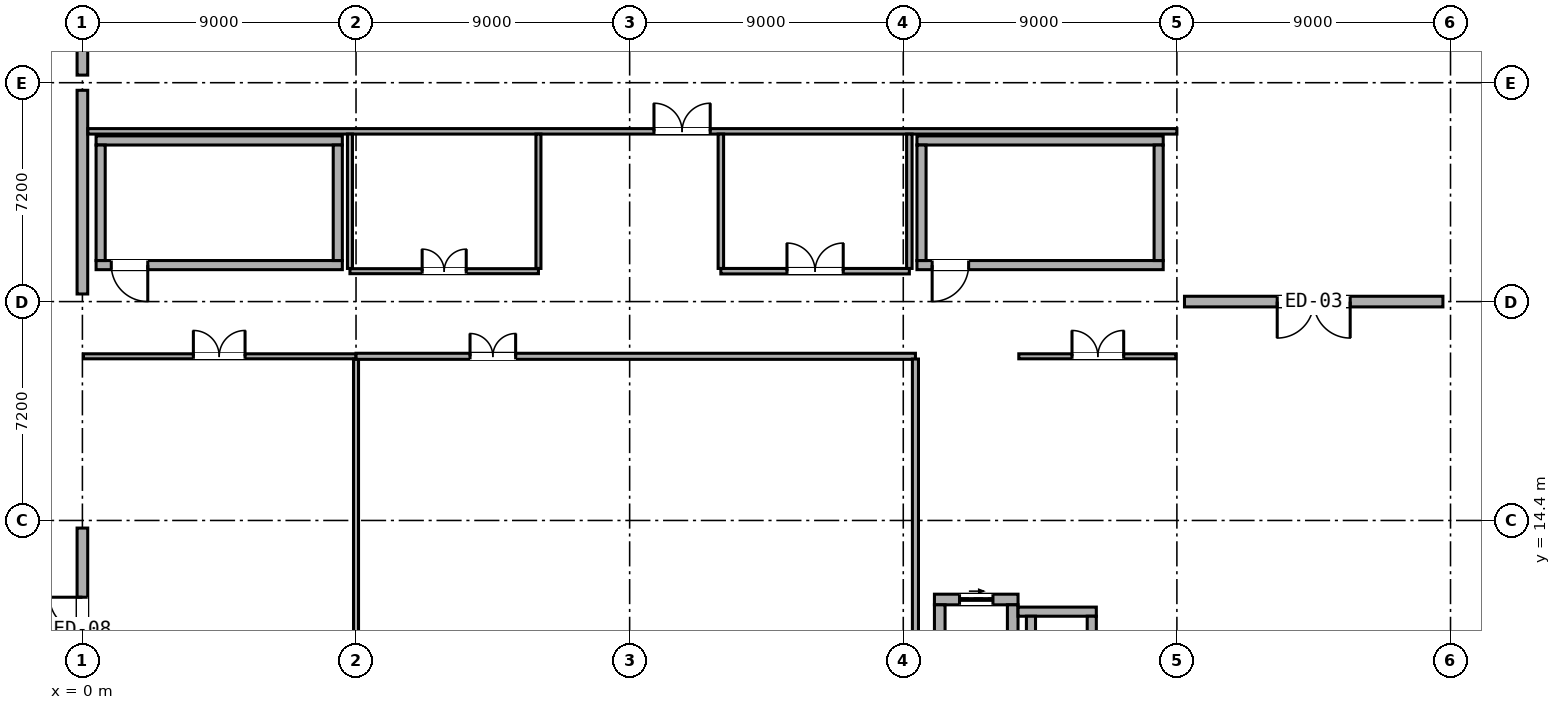
"""IFC4 building model, lengths in metres.
Left out: names, types, materials, properties, quantities, classifications, styles, units other than length and angle.
Written with IfcOpenShell. Run it as: python <this file> out.ifc"""

import sys

from ifc_helpers import new_model, si_unit, direction, frame, frame_2d, origin, origin_2d, place, context, subcontext, project, spatial, rectangle, hollow_rectangle, extrude, element, fill, save


model = new_model("IFC4")
c1 = context("Model", 3, precision=1e-05, world=origin(), true_north=direction((0.0, 1.0)))
c2 = subcontext(c1, "Body", "Model", "MODEL_VIEW")
j1 = project(units=[si_unit("LENGTHUNIT", "METRE"), si_unit("PLANEANGLEUNIT", "RADIAN")], contexts=[c1])
p1 = place(None, origin())
s1 = spatial("IfcSite", under=j1, at=p1, CompositionType="ELEMENT")
p2 = place(p1, origin())
s2 = spatial("IfcBuilding", under=s1, at=p2, CompositionType="ELEMENT")
p3 = place(p2, origin())
s3 = spatial("IfcBuildingStorey", under=s2, at=p3, CompositionType="ELEMENT", Elevation=0.0)
for number, where, z_axis, x_axis in (
    (1, (0.0, 14.4, 0.0), (0.0, 0.0, 1.0), (1.0, 0.0, 0.0)),
    (2, (0.0, 21.6, 0.0), (0.0, 0.0, 1.0), (1.0, 0.0, 0.0)),
    (3, (0.0, 28.8, 0.0), (0.0, 0.0, 1.0), (1.0, 0.0, 0.0)),
):
    element("IfcColumn", number, at=place(p3, frame(where, z_axis=z_axis, x_axis=x_axis)), inside=s3, PredefinedType="COLUMN", context=c2, shape_type="SweptSolid", body=[
        extrude(hollow_rectangle(XDim=0.5, YDim=0.5, WallThickness=0.022, at=origin_2d()), origin(), (0.0, 0.0, 1.0), 4.8),
    ])
for number, where, z_axis, x_axis in (
    (4, (9.0, 14.4, 0.0), (0.0, 0.0, 1.0), (1.0, 0.0, 0.0)),
    (5, (9.0, 21.6, 0.0), (0.0, 0.0, 1.0), (1.0, 0.0, 0.0)),
    (6, (9.0, 28.8, 0.0), (0.0, 0.0, 1.0), (1.0, 0.0, 0.0)),
    (7, (18.0, 21.6, 0.0), (0.0, 0.0, 1.0), (1.0, 0.0, 0.0)),
    (8, (18.0, 28.8, 0.0), (0.0, 0.0, 1.0), (1.0, 0.0, 0.0)),
    (9, (27.0, 14.4, 0.0), (0.0, 0.0, 1.0), (1.0, 0.0, 0.0)),
    (10, (27.0, 21.6, 0.0), (0.0, 0.0, 1.0), (1.0, 0.0, 0.0)),
    (11, (27.0, 28.8, 0.0), (0.0, 0.0, 1.0), (1.0, 0.0, 0.0)),
):
    element("IfcColumn", number, at=place(p3, frame(where, z_axis=z_axis, x_axis=x_axis)), inside=s3, PredefinedType="COLUMN", context=c2, shape_type="SweptSolid", body=[
        extrude(hollow_rectangle(XDim=0.65, YDim=0.65, WallThickness=0.025, at=origin_2d()), origin(), (0.0, 0.0, 1.0), 4.8),
    ])
for number, where, z_axis, x_axis in (
    (12, (36.0, 14.4, 0.0), (0.0, 0.0, 1.0), (1.0, 0.0, 0.0)),
    (13, (36.0, 21.6, 0.0), (0.0, 0.0, 1.0), (1.0, 0.0, 0.0)),
    (14, (36.0, 28.8, 0.0), (0.0, 0.0, 1.0), (1.0, 0.0, 0.0)),
):
    element("IfcColumn", number, at=place(p3, frame(where, z_axis=z_axis, x_axis=x_axis)), inside=s3, PredefinedType="COLUMN", context=c2, shape_type="SweptSolid", body=[
        extrude(hollow_rectangle(XDim=0.5, YDim=0.5, WallThickness=0.022, at=origin_2d()), origin(), (0.0, 0.0, 1.0), 4.8),
    ])
p4 = place(p3, frame((45.0, 14.4, 0.0), z_axis=(0.0, 0.0, 1.0), x_axis=(1.0, 0.0, 0.0)))
e15 = element("IfcColumn", 15, at=p4, inside=s3, PredefinedType="COLUMN", context=c2, shape_type="SweptSolid", body=[
    extrude(hollow_rectangle(XDim=0.5, YDim=0.5, WallThickness=0.022, at=origin_2d()), origin(), (0.0, 0.0, 1.0), 4.58),
])
for number, where, z_axis, x_axis in (
    (16, (45.0, 21.6, 0.0), (0.0, 0.0, 1.0), (1.0, 0.0, 0.0)),
    (17, (45.0, 28.8, 0.0), (0.0, 0.0, 1.0), (1.0, 0.0, 0.0)),
):
    element("IfcColumn", number, at=place(p3, frame(where, z_axis=z_axis, x_axis=x_axis)), inside=s3, PredefinedType="COLUMN", context=c2, shape_type="SweptSolid", body=[
        extrude(hollow_rectangle(XDim=0.5, YDim=0.5, WallThickness=0.022, at=origin_2d()), origin(), (0.0, 0.0, 1.0), 4.8),
    ])
p5 = place(p3, frame((36.25, 21.6, 0.0), z_axis=(0.0, 0.0, 1.0), x_axis=(1.0, 0.0, 0.0)))
e18 = element("IfcWall", 18, at=p5, inside=s3, PredefinedType="STANDARD", context=c2, shape_type="SweptSolid", body=[
    extrude(rectangle(XDim=8.5, YDim=0.35, at=frame_2d((4.25, 0.0))), origin(), (0.0, 0.0, 1.0), 4.055),
])
p6 = place(p5, frame((3.05, 0.0, 0.0)))
e19 = element("IfcOpeningElement", 19, at=p6, cuts=e18, PredefinedType="OPENING", context=c2, shape_type="SweptSolid", body=[
    extrude(rectangle(XDim=2.4, YDim=2.55, at=frame_2d((1.2, 1.275))), frame((0.0, 0.187, 0.0), z_axis=(0.0, -1.0, 0.0), x_axis=(1.0, 0.0, 0.0)), (0.0, 0.0, 1.0), 0.374),
])
p7 = place(p3, frame((0.0, 7.45, 0.0), z_axis=(0.0, 0.0, 1.0), x_axis=(0.0, 1.0, 0.0)))
e20 = element("IfcWall", 20, at=p7, inside=s3, PredefinedType="STANDARD", context=c2, shape_type="SweptSolid", body=[
    extrude(rectangle(XDim=6.7, YDim=0.35, at=frame_2d((3.35, 0.0))), origin(), (0.0, 0.0, 1.0), 4.055),
])
p8 = place(p7, frame((2.275, 0.0, 0.0)))
e21 = element("IfcOpeningElement", 21, at=p8, cuts=e20, PredefinedType="OPENING", context=c2, shape_type="SweptSolid", body=[
    extrude(rectangle(XDim=2.15, YDim=2.48, at=frame_2d((1.075, 1.24))), frame((0.0, 0.187, 0.0), z_axis=(0.0, -1.0, 0.0), x_axis=(1.0, 0.0, 0.0)), (0.0, 0.0, 1.0), 0.374),
])
p9 = place(p3, frame((0.0, 21.85, 0.0), z_axis=(0.0, 0.0, 1.0), x_axis=(0.0, 1.0, 0.0)))
e22 = element("IfcWall", 22, at=p9, inside=s3, PredefinedType="STANDARD", context=c2, shape_type="SweptSolid", body=[
    extrude(rectangle(XDim=6.7, YDim=0.35, at=frame_2d((3.35, 0.0))), origin(), (0.0, 0.0, 1.0), 4.055),
])
p10 = place(p3, frame((0.0, 29.05, 0.0), z_axis=(0.0, 0.0, 1.0), x_axis=(0.0, 1.0, 0.0)))
e23 = element("IfcWall", 23, at=p10, inside=s3, PredefinedType="STANDARD", context=c2, shape_type="SweptSolid", body=[
    extrude(rectangle(XDim=6.7, YDim=0.35, at=frame_2d((3.35, 0.0))), origin(), (0.0, 0.0, 1.0), 4.055),
])
p11 = place(p10, frame((2.05, 0.0, 0.85)))
e24 = element("IfcOpeningElement", 24, at=p11, cuts=e23, PredefinedType="OPENING", context=c2, shape_type="SweptSolid", body=[
    extrude(rectangle(XDim=2.6, YDim=1.6, at=frame_2d((1.3, 0.8))), frame((0.0, 0.187, 0.0), z_axis=(0.0, -1.0, 0.0), x_axis=(1.0, 0.0, 0.0)), (0.0, 0.0, 1.0), 0.374),
])
p12 = place(p3, frame((0.45, 22.8, 0.0), z_axis=(0.0, 0.0, 1.0), x_axis=(1.0, 0.0, 0.0)))
e25 = element("IfcWall", 25, at=p12, inside=s3, PredefinedType="SHEAR", context=c2, shape_type="SweptSolid", body=[
    extrude(rectangle(XDim=8.1, YDim=0.3, at=frame_2d((4.05, 0.0))), origin(), (0.0, 0.0, 1.0), 4.555),
])
p13 = place(p12, frame((0.5, 0.0, 0.0)))
e26 = element("IfcOpeningElement", 26, at=p13, cuts=e25, PredefinedType="OPENING", context=c2, shape_type="SweptSolid", body=[
    extrude(rectangle(XDim=1.2, YDim=2.1, at=frame_2d((0.6, 1.05))), frame((0.0, 0.162, 0.0), z_axis=(0.0, -1.0, 0.0), x_axis=(1.0, 0.0, 0.0)), (0.0, 0.0, 1.0), 0.324),
])
p14 = place(p3, frame((0.45, 26.9, 0.0), z_axis=(0.0, 0.0, 1.0), x_axis=(1.0, 0.0, 0.0)))
e27 = element("IfcWall", 27, at=p14, inside=s3, PredefinedType="SHEAR", context=c2, shape_type="SweptSolid", body=[
    extrude(rectangle(XDim=8.1, YDim=0.3, at=frame_2d((4.05, 0.0))), origin(), (0.0, 0.0, 1.0), 4.555),
])
for number, where, z_axis, x_axis in (
    (28, (0.6, 22.95, 0.0), (0.0, 0.0, 1.0), (0.0, 1.0, 0.0)),
    (29, (8.4, 22.95, 0.0), (0.0, 0.0, 1.0), (0.0, 1.0, 0.0)),
):
    element("IfcWall", number, at=place(p3, frame(where, z_axis=z_axis, x_axis=x_axis)), inside=s3, PredefinedType="SHEAR", context=c2, shape_type="SweptSolid", body=[
        extrude(rectangle(XDim=3.8, YDim=0.3, at=frame_2d((1.9, 0.0))), origin(), (0.0, 0.0, 1.0), 4.555),
    ])
p15 = place(p3, frame((27.45, 22.8, 0.0), z_axis=(0.0, 0.0, 1.0), x_axis=(1.0, 0.0, 0.0)))
e30 = element("IfcWall", 30, at=p15, inside=s3, PredefinedType="SHEAR", context=c2, shape_type="SweptSolid", body=[
    extrude(rectangle(XDim=8.1, YDim=0.3, at=frame_2d((4.05, 0.0))), origin(), (0.0, 0.0, 1.0), 4.555),
])
p16 = place(p15, frame((0.5, 0.0, 0.0)))
e31 = element("IfcOpeningElement", 31, at=p16, cuts=e30, PredefinedType="OPENING", context=c2, shape_type="SweptSolid", body=[
    extrude(rectangle(XDim=1.2, YDim=2.1, at=frame_2d((0.6, 1.05))), frame((0.0, 0.162, 0.0), z_axis=(0.0, -1.0, 0.0), x_axis=(1.0, 0.0, 0.0)), (0.0, 0.0, 1.0), 0.324),
])
p17 = place(p3, frame((27.45, 26.9, 0.0), z_axis=(0.0, 0.0, 1.0), x_axis=(1.0, 0.0, 0.0)))
e32 = element("IfcWall", 32, at=p17, inside=s3, PredefinedType="SHEAR", context=c2, shape_type="SweptSolid", body=[
    extrude(rectangle(XDim=8.1, YDim=0.3, at=frame_2d((4.05, 0.0))), origin(), (0.0, 0.0, 1.0), 4.555),
])
for number, where, z_axis, x_axis in (
    (33, (27.6, 22.95, 0.0), (0.0, 0.0, 1.0), (0.0, 1.0, 0.0)),
    (34, (35.4, 22.95, 0.0), (0.0, 0.0, 1.0), (0.0, 1.0, 0.0)),
):
    element("IfcWall", number, at=place(p3, frame(where, z_axis=z_axis, x_axis=x_axis)), inside=s3, PredefinedType="SHEAR", context=c2, shape_type="SweptSolid", body=[
        extrude(rectangle(XDim=3.8, YDim=0.3, at=frame_2d((1.9, 0.0))), origin(), (0.0, 0.0, 1.0), 4.555),
    ])
p18 = place(p3, frame((28.025, 11.8, 0.0), z_axis=(0.0, 0.0, 1.0), x_axis=(1.0, 0.0, 0.0)))
e35 = element("IfcWall", 35, at=p18, inside=s3, PredefinedType="SHEAR", context=c2, shape_type="SweptSolid", body=[
    extrude(rectangle(XDim=2.75, YDim=0.35, at=frame_2d((1.375, 0.0))), origin(), (0.0, 0.0, 1.0), 4.555),
])
p19 = place(p18, frame((0.825, 0.0, 0.0)))
e36 = element("IfcOpeningElement", 36, at=p19, cuts=e35, PredefinedType="OPENING", context=c2, shape_type="SweptSolid", body=[
    extrude(rectangle(XDim=1.1, YDim=2.1, at=frame_2d((0.55, 1.05))), frame((0.0, 0.187, 0.0), z_axis=(0.0, -1.0, 0.0), x_axis=(1.0, 0.0, 0.0)), (0.0, 0.0, 1.0), 0.374),
])
for number, where, z_axis, x_axis in (
    (37, (28.2, 9.375, 0.0), (0.0, 0.0, 1.0), (0.0, 1.0, 0.0)),
    (38, (30.6, 9.375, 0.0), (0.0, 0.0, 1.0), (0.0, 1.0, 0.0)),
):
    element("IfcWall", number, at=place(p3, frame(where, z_axis=z_axis, x_axis=x_axis)), inside=s3, PredefinedType="SHEAR", context=c2, shape_type="SweptSolid", body=[
        extrude(rectangle(XDim=2.25, YDim=0.35, at=frame_2d((1.125, 0.0))), origin(), (0.0, 0.0, 1.0), 4.555),
    ])
p20 = place(p3, frame((30.775, 11.4, 0.0), z_axis=(0.0, 0.0, 1.0), x_axis=(1.0, 0.0, 0.0)))
e39 = element("IfcWall", 39, at=p20, inside=s3, PredefinedType="SHEAR", context=c2, shape_type="SweptSolid", body=[
    extrude(rectangle(XDim=2.575, YDim=0.3, at=frame_2d((1.288, 0.0))), origin(), (0.0, 0.0, 1.0), 4.555),
])
for number, where, z_axis, x_axis in (
    (40, (31.2, 9.35, 0.0), (0.0, 0.0, 1.0), (0.0, 1.0, 0.0)),
    (41, (33.2, 9.35, 0.0), (0.0, 0.0, 1.0), (0.0, 1.0, 0.0)),
):
    element("IfcWall", number, at=place(p3, frame(where, z_axis=z_axis, x_axis=x_axis)), inside=s3, PredefinedType="SHEAR", context=c2, shape_type="SweptSolid", body=[
        extrude(rectangle(XDim=1.9, YDim=0.3, at=frame_2d((0.95, 0.0))), origin(), (0.0, 0.0, 1.0), 4.555),
    ])
p21 = place(p3, frame((0.035, 19.8, 0.0), z_axis=(0.0, 0.0, 1.0), x_axis=(1.0, 0.0, 0.0)))
e42 = element("IfcWall", 42, at=p21, inside=s3, PredefinedType="PARTITIONING", context=c2, shape_type="SweptSolid", body=[
    extrude(rectangle(XDim=8.965, YDim=0.165, at=frame_2d((4.482, 0.0))), origin(), (0.0, 0.0, 1.0), 4.555),
])
p22 = place(p21, frame((3.615, 0.0, 0.0)))
e43 = element("IfcOpeningElement", 43, at=p22, cuts=e42, PredefinedType="OPENING", context=c2, shape_type="SweptSolid", body=[
    extrude(rectangle(XDim=1.7, YDim=2.12, at=frame_2d((0.85, 1.06))), frame((0.0, 0.094, 0.0), z_axis=(0.0, -1.0, 0.0), x_axis=(1.0, 0.0, 0.0)), (0.0, 0.0, 1.0), 0.189),
])
p23 = place(p3, frame((9.0, 0.6, 0.0), z_axis=(0.0, 0.0, 1.0), x_axis=(0.0, 1.0, 0.0)))
e44 = element("IfcWall", 44, at=p23, inside=s3, PredefinedType="PARTITIONING", context=c2, shape_type="SweptSolid", body=[
    extrude(rectangle(XDim=19.11, YDim=0.165, at=frame_2d((9.555, 0.0))), origin(), (0.0, 0.0, 1.0), 3.835),
])
p24 = place(p3, frame((9.0, 19.8, 0.0), z_axis=(0.0, 0.0, 1.0), x_axis=(1.0, 0.0, 0.0)))
e45 = element("IfcWall", 45, at=p24, inside=s3, PredefinedType="PARTITIONING", context=c2, shape_type="SweptSolid", body=[
    extrude(rectangle(XDim=18.4, YDim=0.2, at=frame_2d((9.2, 0.0))), origin(), (0.0, 0.0, 1.0), 4.555),
])
p25 = place(p24, frame((3.75, 0.0, 0.0)))
e46 = element("IfcOpeningElement", 46, at=p25, cuts=e45, PredefinedType="OPENING", context=c2, shape_type="SweptSolid", body=[
    extrude(rectangle(XDim=1.5, YDim=2.1, at=frame_2d((0.75, 1.05))), frame((0.0, 0.112, 0.0), z_axis=(0.0, -1.0, 0.0), x_axis=(1.0, 0.0, 0.0)), (0.0, 0.0, 1.0), 0.224),
])
p26 = place(p3, frame((27.4, 0.18, 0.0), z_axis=(0.0, 0.0, 1.0), x_axis=(0.0, 1.0, 0.0)))
e47 = element("IfcWall", 47, at=p26, inside=s3, PredefinedType="PARTITIONING", context=c2, shape_type="SweptSolid", body=[
    extrude(rectangle(XDim=19.53, YDim=0.2, at=frame_2d((9.765, 0.0))), origin(), (0.0, 0.0, 1.0), 4.555),
])
p27 = place(p3, frame((30.8, 19.8, 0.0), z_axis=(0.0, 0.0, 1.0), x_axis=(1.0, 0.0, 0.0)))
e48 = element("IfcWall", 48, at=p27, inside=s3, PredefinedType="PARTITIONING", context=c2, shape_type="SweptSolid", body=[
    extrude(rectangle(XDim=5.165, YDim=0.165, at=frame_2d((2.583, 0.0))), origin(), (0.0, 0.0, 1.0), 4.555),
])
p28 = place(p27, frame((1.75, 0.0, 0.0)))
e49 = element("IfcOpeningElement", 49, at=p28, cuts=e48, PredefinedType="OPENING", context=c2, shape_type="SweptSolid", body=[
    extrude(rectangle(XDim=1.7, YDim=2.12, at=frame_2d((0.85, 1.06))), frame((0.0, 0.094, 0.0), z_axis=(0.0, -1.0, 0.0), x_axis=(1.0, 0.0, 0.0)), (0.0, 0.0, 1.0), 0.189),
])
p29 = place(p3, frame((0.18, 27.2, 0.0), z_axis=(0.0, 0.0, 1.0), x_axis=(1.0, 0.0, 0.0)))
e50 = element("IfcWall", 50, at=p29, inside=s3, PredefinedType="PARTITIONING", context=c2, shape_type="SweptSolid", body=[
    extrude(rectangle(XDim=35.82, YDim=0.18, at=frame_2d((17.91, 0.0))), origin(), (0.0, 0.0, 1.0), 4.555),
])
p30 = place(p29, frame((18.62, 0.0, 0.0)))
e51 = element("IfcOpeningElement", 51, at=p30, cuts=e50, PredefinedType="OPENING", context=c2, shape_type="SweptSolid", body=[
    extrude(rectangle(XDim=1.85, YDim=2.12, at=frame_2d((0.925, 1.06))), frame((0.0, 0.102, 0.0), z_axis=(0.0, -1.0, 0.0), x_axis=(1.0, 0.0, 0.0)), (0.0, 0.0, 1.0), 0.204),
])
p31 = place(p3, frame((8.8, 22.6, 0.0), z_axis=(0.0, 0.0, 1.0), x_axis=(1.0, 0.0, 0.0)))
e52 = element("IfcWall", 52, at=p31, inside=s3, PredefinedType="PARTITIONING", context=c2, shape_type="SweptSolid", body=[
    extrude(rectangle(XDim=6.2, YDim=0.165, at=frame_2d((3.1, 0.0))), origin(), (0.0, 0.0, 1.0), 4.555),
])
p32 = place(p31, frame((2.375, 0.0, 0.0)))
e53 = element("IfcOpeningElement", 53, at=p32, cuts=e52, PredefinedType="OPENING", context=c2, shape_type="SweptSolid", body=[
    extrude(rectangle(XDim=1.45, YDim=2.1, at=frame_2d((0.725, 1.05))), frame((0.0, 0.094, 0.0), z_axis=(0.0, -1.0, 0.0), x_axis=(1.0, 0.0, 0.0)), (0.0, 0.0, 1.0), 0.189),
])
p33 = place(p3, frame((8.8, 22.69, 0.0), z_axis=(0.0, 0.0, 1.0), x_axis=(0.0, 1.0, 0.0)))
e54 = element("IfcWall", 54, at=p33, inside=s3, PredefinedType="PARTITIONING", context=c2, shape_type="SweptSolid", body=[
    extrude(rectangle(XDim=4.42, YDim=0.165, at=frame_2d((2.21, 0.0))), origin(), (0.0, 0.0, 1.0), 3.835),
])
p34 = place(p3, frame((15.0, 22.69, 0.0), z_axis=(0.0, 0.0, 1.0), x_axis=(0.0, 1.0, 0.0)))
e55 = element("IfcWall", 55, at=p34, inside=s3, PredefinedType="PARTITIONING", context=c2, shape_type="SweptSolid", body=[
    extrude(rectangle(XDim=4.42, YDim=0.165, at=frame_2d((2.21, 0.0))), origin(), (0.0, 0.0, 1.0), 4.555),
])
p35 = place(p3, frame((21.0, 22.6, 0.0), z_axis=(0.0, 0.0, 1.0), x_axis=(1.0, 0.0, 0.0)))
e56 = element("IfcWall", 56, at=p35, inside=s3, PredefinedType="PARTITIONING", context=c2, shape_type="SweptSolid", body=[
    extrude(rectangle(XDim=6.2, YDim=0.18, at=frame_2d((3.1, 0.0))), origin(), (0.0, 0.0, 1.0), 4.555),
])
p36 = place(p35, frame((2.175, 0.0, 0.0)))
e57 = element("IfcOpeningElement", 57, at=p36, cuts=e56, PredefinedType="OPENING", context=c2, shape_type="SweptSolid", body=[
    extrude(rectangle(XDim=1.85, YDim=2.12, at=frame_2d((0.925, 1.06))), frame((0.0, 0.102, 0.0), z_axis=(0.0, -1.0, 0.0), x_axis=(1.0, 0.0, 0.0)), (0.0, 0.0, 1.0), 0.204),
])
p37 = place(p3, frame((21.0, 22.69, 0.0), z_axis=(0.0, 0.0, 1.0), x_axis=(0.0, 1.0, 0.0)))
e58 = element("IfcWall", 58, at=p37, inside=s3, PredefinedType="PARTITIONING", context=c2, shape_type="SweptSolid", body=[
    extrude(rectangle(XDim=4.42, YDim=0.18, at=frame_2d((2.21, 0.0))), origin(), (0.0, 0.0, 1.0), 4.555),
])
p38 = place(p3, frame((27.2, 22.69, 0.0), z_axis=(0.0, 0.0, 1.0), x_axis=(0.0, 1.0, 0.0)))
e59 = element("IfcWall", 59, at=p38, inside=s3, PredefinedType="PARTITIONING", context=c2, shape_type="SweptSolid", body=[
    extrude(rectangle(XDim=4.42, YDim=0.18, at=frame_2d((2.21, 0.0))), origin(), (0.0, 0.0, 1.0), 3.835),
])
p39 = place(p6, frame((2.4, 0.0, 0.0), z_axis=(0.0, 0.0, 1.0), x_axis=(-1.0, 0.0, 0.0)))
e60 = element("IfcDoor", 60, at=p39, inside=s3, OperationType="DOUBLE_DOOR_SINGLE_SWING", PredefinedType="DOOR", context=c2, shape_type="SweptSolid", body=[
    extrude(rectangle(XDim=2.4, YDim=2.55, at=frame_2d((1.2, 1.275))), frame((0.0, 0.025, 0.0), z_axis=(0.0, -1.0, 0.0), x_axis=(1.0, 0.0, 0.0)), (0.0, 0.0, 1.0), 0.05),
])
fill(e19, e60)
p40 = place(p8, origin())
e61 = element("IfcDoor", 61, at=p40, inside=s3, OperationType="DOUBLE_DOOR_SINGLE_SWING", PredefinedType="DOOR", context=c2, shape_type="SweptSolid", body=[
    extrude(rectangle(XDim=2.15, YDim=2.48, at=frame_2d((1.075, 1.24))), frame((0.0, 0.025, 0.0), z_axis=(0.0, -1.0, 0.0), x_axis=(1.0, 0.0, 0.0)), (0.0, 0.0, 1.0), 0.05),
])
fill(e21, e61)
p41 = place(p13, frame((1.2, 0.0, 0.0), z_axis=(0.0, 0.0, 1.0), x_axis=(-1.0, 0.0, 0.0)))
e62 = element("IfcDoor", 62, at=p41, inside=s3, OperationType="SINGLE_SWING_LEFT", PredefinedType="DOOR", context=c2, shape_type="SweptSolid", body=[
    extrude(rectangle(XDim=1.2, YDim=2.1, at=frame_2d((0.6, 1.05))), frame((0.0, 0.025, 0.0), z_axis=(0.0, -1.0, 0.0), x_axis=(1.0, 0.0, 0.0)), (0.0, 0.0, 1.0), 0.05),
])
fill(e26, e62)
p42 = place(p16, frame((1.2, 0.0, 0.0), z_axis=(0.0, 0.0, 1.0), x_axis=(-1.0, 0.0, 0.0)))
e63 = element("IfcDoor", 63, at=p42, inside=s3, OperationType="SINGLE_SWING_RIGHT", PredefinedType="DOOR", context=c2, shape_type="SweptSolid", body=[
    extrude(rectangle(XDim=1.2, YDim=2.1, at=frame_2d((0.6, 1.05))), frame((0.0, 0.025, 0.0), z_axis=(0.0, -1.0, 0.0), x_axis=(1.0, 0.0, 0.0)), (0.0, 0.0, 1.0), 0.05),
])
fill(e31, e63)
p43 = place(p19, origin())
e64 = element("IfcDoor", 64, at=p43, inside=s3, OperationType="SLIDING_TO_RIGHT", PredefinedType="DOOR", context=c2, shape_type="SweptSolid", body=[
    extrude(rectangle(XDim=1.1, YDim=2.1, at=frame_2d((0.55, 1.05))), frame((0.0, 0.025, 0.0), z_axis=(0.0, -1.0, 0.0), x_axis=(1.0, 0.0, 0.0)), (0.0, 0.0, 1.0), 0.05),
])
fill(e36, e64)
p44 = place(p22, origin())
e65 = element("IfcDoor", 65, at=p44, inside=s3, OperationType="DOUBLE_DOOR_SINGLE_SWING", PredefinedType="DOOR", context=c2, shape_type="SweptSolid", body=[
    extrude(rectangle(XDim=1.7, YDim=2.12, at=frame_2d((0.85, 1.06))), frame((0.0, 0.025, 0.0), z_axis=(0.0, -1.0, 0.0), x_axis=(1.0, 0.0, 0.0)), (0.0, 0.0, 1.0), 0.05),
])
fill(e43, e65)
p45 = place(p25, origin())
e66 = element("IfcDoor", 66, at=p45, inside=s3, OperationType="DOUBLE_DOOR_SINGLE_SWING", PredefinedType="DOOR", context=c2, shape_type="SweptSolid", body=[
    extrude(rectangle(XDim=1.5, YDim=2.1, at=frame_2d((0.75, 1.05))), frame((0.0, 0.025, 0.0), z_axis=(0.0, -1.0, 0.0), x_axis=(1.0, 0.0, 0.0)), (0.0, 0.0, 1.0), 0.05),
])
fill(e46, e66)
p46 = place(p28, origin())
e67 = element("IfcDoor", 67, at=p46, inside=s3, OperationType="DOUBLE_DOOR_SINGLE_SWING", PredefinedType="DOOR", context=c2, shape_type="SweptSolid", body=[
    extrude(rectangle(XDim=1.7, YDim=2.12, at=frame_2d((0.85, 1.06))), frame((0.0, 0.025, 0.0), z_axis=(0.0, -1.0, 0.0), x_axis=(1.0, 0.0, 0.0)), (0.0, 0.0, 1.0), 0.05),
])
fill(e49, e67)
p47 = place(p30, origin())
e68 = element("IfcDoor", 68, at=p47, inside=s3, OperationType="DOUBLE_DOOR_SINGLE_SWING", PredefinedType="DOOR", context=c2, shape_type="SweptSolid", body=[
    extrude(rectangle(XDim=1.85, YDim=2.12, at=frame_2d((0.925, 1.06))), frame((0.0, 0.025, 0.0), z_axis=(0.0, -1.0, 0.0), x_axis=(1.0, 0.0, 0.0)), (0.0, 0.0, 1.0), 0.05),
])
fill(e51, e68)
p48 = place(p32, origin())
e69 = element("IfcDoor", 69, at=p48, inside=s3, OperationType="DOUBLE_DOOR_SINGLE_SWING", PredefinedType="DOOR", context=c2, shape_type="SweptSolid", body=[
    extrude(rectangle(XDim=1.45, YDim=2.1, at=frame_2d((0.725, 1.05))), frame((0.0, 0.025, 0.0), z_axis=(0.0, -1.0, 0.0), x_axis=(1.0, 0.0, 0.0)), (0.0, 0.0, 1.0), 0.05),
])
fill(e53, e69)
p49 = place(p36, origin())
e70 = element("IfcDoor", 70, at=p49, inside=s3, OperationType="DOUBLE_DOOR_SINGLE_SWING", PredefinedType="DOOR", context=c2, shape_type="SweptSolid", body=[
    extrude(rectangle(XDim=1.85, YDim=2.12, at=frame_2d((0.925, 1.06))), frame((0.0, 0.025, 0.0), z_axis=(0.0, -1.0, 0.0), x_axis=(1.0, 0.0, 0.0)), (0.0, 0.0, 1.0), 0.05),
])
fill(e57, e70)
save(model, sys.argv[1])
